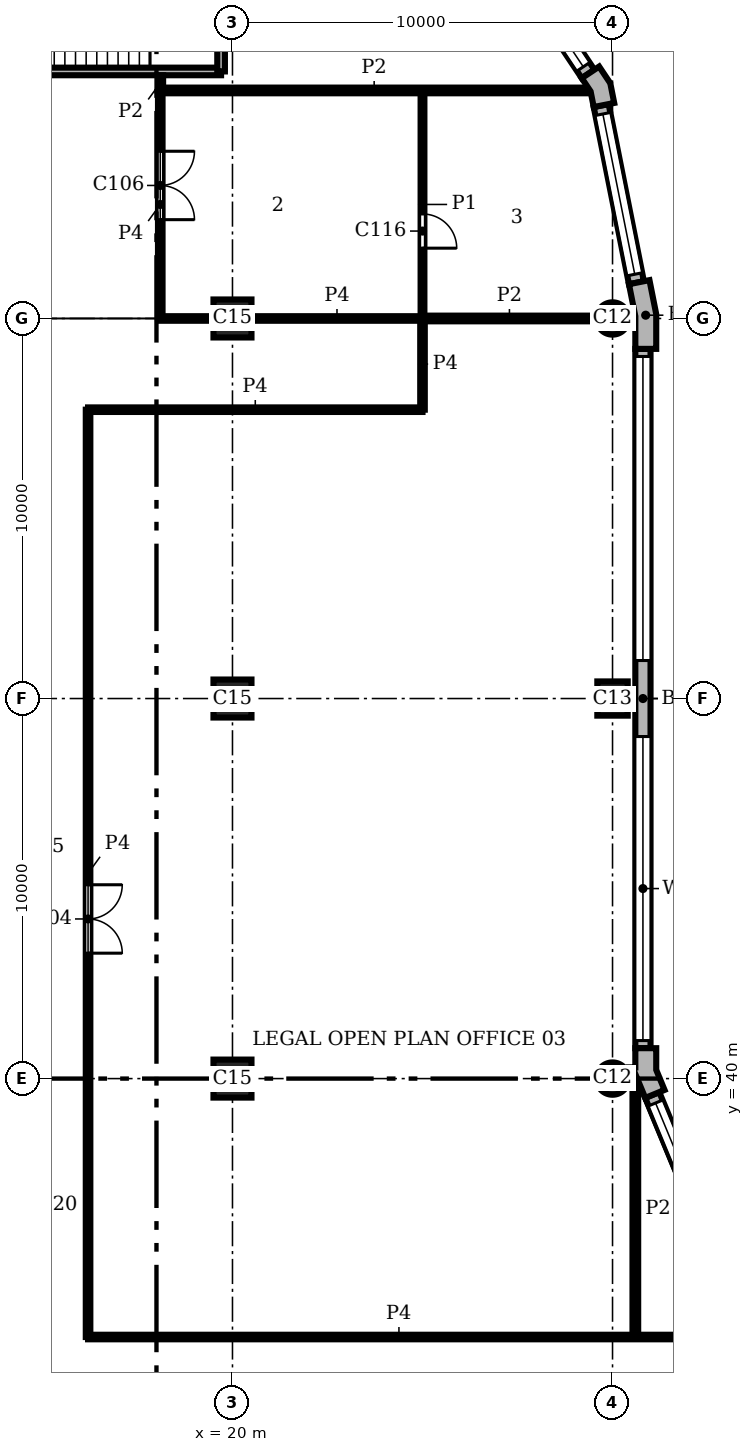
"""IFC4 building model, lengths in metres.
Left out: names, types, materials, properties, quantities, classifications, styles, units other than length and angle.
Written with IfcOpenShell. Run it as: python <this file> out.ifc"""

import sys

from ifc_helpers import new_model, si_unit, direction, frame, frame_2d, origin, origin_2d, place, context, subcontext, project, spatial, polyline, rectangle, circle, outline, extrude, element, fill, save


model = new_model("IFC4")
c1 = context("Model", 3, precision=1e-05, world=origin(), true_north=direction((0.0, 1.0)))
c2 = subcontext(c1, "Body", "Model", "MODEL_VIEW")
j1 = project(units=[si_unit("LENGTHUNIT", "METRE"), si_unit("PLANEANGLEUNIT", "RADIAN")], contexts=[c1])
p1 = place(None, origin())
s1 = spatial("IfcSite", under=j1, at=p1, CompositionType="ELEMENT")
p2 = place(p1, origin())
s2 = spatial("IfcBuilding", under=s1, at=p2, CompositionType="ELEMENT")
p3 = place(p2, frame((0.0, 0.0, 251.4)))
s3 = spatial("IfcBuildingStorey", under=s2, at=p3, CompositionType="ELEMENT", Elevation=251.4)
p4 = place(p3, frame((30.0, 40.0, 0.0), z_axis=(0.0, 0.0, 1.0), x_axis=(1.0, 0.0, 0.0)))
e1 = element("IfcColumn", 1, at=p4, inside=s3, PredefinedType="COLUMN", context=c2, shape_type="SweptSolid", body=[
    extrude(circle(Radius=0.425, at=origin_2d()), origin(), (0.0, 0.0, 1.0), 3.9),
])
p5 = place(p3, frame((30.0, 50.0, 0.0), z_axis=(0.0, 0.0, 1.0), x_axis=(0.0, 1.0, 0.0)))
e2 = element("IfcColumn", 2, at=p5, inside=s3, PredefinedType="COLUMN", context=c2, shape_type="SweptSolid", body=[
    extrude(rectangle(XDim=0.9, YDim=0.8, at=origin_2d()), origin(), (0.0, 0.0, 1.0), 3.9),
])
p6 = place(p3, frame((30.0, 60.0, 0.0), z_axis=(0.0, 0.0, 1.0), x_axis=(1.0, 0.0, 0.0)))
e3 = element("IfcColumn", 3, at=p6, inside=s3, PredefinedType="COLUMN", context=c2, shape_type="SweptSolid", body=[
    extrude(circle(Radius=0.425, at=origin_2d()), origin(), (0.0, 0.0, 1.0), 3.9),
])
for number, where, z_axis, x_axis in (
    (4, (20.0, 40.0, 0.0), (0.0, 0.0, 1.0), (1.0, 0.0, 0.0)),
    (5, (20.0, 50.0, 0.0), (0.0, 0.0, 1.0), (1.0, 0.0, 0.0)),
    (6, (20.0, 60.0, 0.0), (0.0, 0.0, 1.0), (1.0, 0.0, 0.0)),
):
    element("IfcColumn", number, at=place(p3, frame(where, z_axis=z_axis, x_axis=x_axis)), inside=s3, PredefinedType="COLUMN", context=c2, shape_type="SweptSolid", body=[
        extrude(rectangle(XDim=1.0, YDim=1.0, at=origin_2d()), origin(), (0.0, 0.0, 1.0), 3.9),
    ])
p7 = place(p3, origin())
e7 = element("IfcWall", 7, at=p7, inside=s3, PredefinedType="SOLIDWALL", context=c2, shape_type="SweptSolid", body=[
    extrude(outline(polyline([(30.62, 39.995), (30.62, 40.071), (30.861, 39.49), (31.23, 39.644), (31.369, 39.701), (31.15, 40.229), (31.15, 40.8), (31.0, 40.8), (30.6, 40.8), (30.6, 40.295), (30.425, 40.295), (30.425, 39.995), (30.62, 39.995)])), origin(), (0.0, 0.0, 1.0), 3.9),
])
e8 = element("IfcWall", 8, at=p7, inside=s3, PredefinedType="SOLIDWALL", context=c2, shape_type="SweptSolid", body=[
    extrude(outline(polyline([(31.0, 59.2), (31.15, 59.2), (31.15, 60.113), (30.972, 61.009), (30.825, 60.98), (30.432, 60.902), (30.6, 60.059), (30.6, 59.2), (31.0, 59.2)])), origin(), (0.0, 0.0, 1.0), 3.9),
])
e9 = element("IfcWall", 9, at=p7, inside=s3, PredefinedType="SOLIDWALL", context=c2, shape_type="SweptSolid", body=[
    extrude(outline(polyline([(29.897, 65.641), (30.045, 65.67), (29.941, 66.189), (29.648, 66.629), (29.523, 66.545), (29.19, 66.323), (29.423, 65.974), (29.505, 65.563), (29.897, 65.641)])), origin(), (0.0, 0.0, 1.0), 3.9),
])
p8 = place(p3, frame((33.362, 33.974, 0.0), z_axis=(0.0, 0.0, 1.0), x_axis=(-0.382655745237, 0.923891000409, 0.0)))
e10 = element("IfcWall", 10, at=p8, inside=s3, PredefinedType="SOLIDWALL", context=c2, shape_type="SweptSolid", body=[
    extrude(rectangle(XDim=6.053, YDim=0.4, at=frame_2d((3.027, 0.0))), origin(), (0.0, 0.0, 1.0), 3.9),
])
p9 = place(p8, frame((0.227, 0.0, 0.9)))
e11 = element("IfcOpeningElement", 11, at=p9, cuts=e10, PredefinedType="OPENING", context=c2, shape_type="SweptSolid", body=[
    extrude(rectangle(XDim=5.6, YDim=2.35, at=frame_2d((2.8, 1.175))), frame((0.0, 0.21, 0.0), z_axis=(0.0, -1.0, 0.0), x_axis=(1.0, 0.0, 0.0)), (0.0, 0.0, 1.0), 0.42),
])
p10 = place(p3, frame((30.8, 40.8, 0.0), z_axis=(0.0, 0.0, 1.0), x_axis=(0.0, 1.0, 0.0)))
e12 = element("IfcWall", 12, at=p10, inside=s3, PredefinedType="SOLIDWALL", context=c2, shape_type="SweptSolid", body=[
    extrude(rectangle(XDim=18.4, YDim=0.4, at=frame_2d((9.2, 0.0))), origin(), (0.0, 0.0, 1.0), 3.9),
])
p11 = place(p10, frame((0.2, 0.0, 0.9)))
e13 = element("IfcOpeningElement", 13, at=p11, cuts=e12, PredefinedType="OPENING", context=c2, shape_type="SweptSolid", body=[
    extrude(rectangle(XDim=8.0, YDim=2.35, at=frame_2d((4.0, 1.175))), frame((0.0, 0.21, 0.0), z_axis=(0.0, -1.0, 0.0), x_axis=(1.0, 0.0, 0.0)), (0.0, 0.0, 1.0), 0.42),
])
p12 = place(p10, frame((10.2, 0.0, 0.9)))
e14 = element("IfcOpeningElement", 14, at=p12, cuts=e12, PredefinedType="OPENING", context=c2, shape_type="SweptSolid", body=[
    extrude(rectangle(XDim=8.0, YDim=2.35, at=frame_2d((4.0, 1.175))), frame((0.0, 0.21, 0.0), z_axis=(0.0, -1.0, 0.0), x_axis=(1.0, 0.0, 0.0)), (0.0, 0.0, 1.0), 0.42),
])
p13 = place(p3, frame((30.629, 60.941, 0.0), z_axis=(0.0, 0.0, 1.0), x_axis=(-0.195098533057, 0.98078364709, 0.0)))
e15 = element("IfcWall", 15, at=p13, inside=s3, PredefinedType="SOLIDWALL", context=c2, shape_type="SweptSolid", body=[
    extrude(rectangle(XDim=4.753, YDim=0.4, at=frame_2d((2.376, 0.0))), origin(), (0.0, 0.0, 1.0), 3.9),
])
p14 = place(p13, frame((0.226, 0.0, 0.9)))
e16 = element("IfcOpeningElement", 16, at=p14, cuts=e15, PredefinedType="OPENING", context=c2, shape_type="SweptSolid", body=[
    extrude(rectangle(XDim=4.3, YDim=2.35, at=frame_2d((2.15, 1.175))), frame((0.0, 0.21, 0.0), z_axis=(0.0, -1.0, 0.0), x_axis=(1.0, 0.0, 0.0)), (0.0, 0.0, 1.0), 0.42),
])
p15 = place(p3, frame((29.357, 66.434, 0.0), z_axis=(0.0, 0.0, 1.0), x_axis=(-0.555541552266, 0.831488775454, 0.0)))
e17 = element("IfcWall", 17, at=p15, inside=s3, PredefinedType="SOLIDWALL", context=c2, shape_type="SweptSolid", body=[
    extrude(rectangle(XDim=4.753, YDim=0.4, at=frame_2d((2.376, 0.0))), origin(), (0.0, 0.0, 1.0), 3.9),
])
p16 = place(p15, frame((0.226, 0.0, 0.9)))
e18 = element("IfcOpeningElement", 18, at=p16, cuts=e17, PredefinedType="OPENING", context=c2, shape_type="SweptSolid", body=[
    extrude(rectangle(XDim=4.3, YDim=2.35, at=frame_2d((2.15, 1.175))), frame((0.0, 0.21, 0.0), z_axis=(0.0, -1.0, 0.0), x_axis=(1.0, 0.0, 0.0)), (0.0, 0.0, 1.0), 0.42),
])
p17 = place(p3, frame((13.1, 66.5, 0.0), z_axis=(0.0, 0.0, 1.0), x_axis=(1.0, 0.0, 0.0)))
e19 = element("IfcWall", 19, at=p17, inside=s3, PredefinedType="SHEAR", context=c2, shape_type="SweptSolid", body=[
    extrude(rectangle(XDim=6.6, YDim=0.2, at=frame_2d((3.3, 0.0))), origin(), (0.0, 0.0, 1.0), 3.58),
])
p18 = place(p17, frame((0.375, 0.0, 0.0)))
e20 = element("IfcOpeningElement", 20, at=p18, cuts=e19, PredefinedType="OPENING", context=c2, shape_type="SweptSolid", body=[
    extrude(rectangle(XDim=1.0, YDim=2.1, at=frame_2d((0.5, 1.05))), frame((0.0, 0.11, 0.0), z_axis=(0.0, -1.0, 0.0), x_axis=(1.0, 0.0, 0.0)), (0.0, 0.0, 1.0), 0.22),
])
p19 = place(p3, frame((19.7, 66.5, 0.0), z_axis=(0.0, 0.0, 1.0), x_axis=(0.0, 1.0, 0.0)))
e21 = element("IfcWall", 21, at=p19, inside=s3, PredefinedType="SHEAR", context=c2, shape_type="SweptSolid", body=[
    extrude(rectangle(XDim=3.3, YDim=0.2, at=frame_2d((1.65, 0.0))), origin(), (0.0, 0.0, 1.0), 3.58),
])
p20 = place(p3, frame((25.0, 60.0, 0.0), z_axis=(0.0, 0.0, 1.0), x_axis=(0.0, 1.0, 0.0)))
e22 = element("IfcWall", 22, at=p20, inside=s3, PredefinedType="PARTITIONING", context=c2, shape_type="SweptSolid", body=[
    extrude(rectangle(XDim=6.0, YDim=0.1, at=frame_2d((3.0, 0.0))), origin(), (0.0, 0.0, 1.0), 3.58),
])
p21 = place(p20, frame((1.85, 0.0, 0.0)))
e23 = element("IfcOpeningElement", 23, at=p21, cuts=e22, PredefinedType="OPENING", context=c2, shape_type="SweptSolid", body=[
    extrude(rectangle(XDim=0.9, YDim=2.1, at=frame_2d((0.45, 1.05))), frame((0.0, 0.06, 0.0), z_axis=(0.0, -1.0, 0.0), x_axis=(1.0, 0.0, 0.0)), (0.0, 0.0, 1.0), 0.12),
])
p22 = place(p3, frame((18.1, 66.0, 0.0), z_axis=(0.0, 0.0, 1.0), x_axis=(0.0, 1.0, 0.0)))
e24 = element("IfcWall", 24, at=p22, inside=s3, PredefinedType="PARTITIONING", context=c2, shape_type="SweptSolid", body=[
    extrude(rectangle(XDim=0.4, YDim=0.15, at=frame_2d((0.2, 0.0))), origin(), (0.0, 0.0, 1.0), 3.58),
])
p23 = place(p3, frame((30.6, 33.2, 0.0), z_axis=(0.0, 0.0, 1.0), x_axis=(0.0, 1.0, 0.0)))
e25 = element("IfcWall", 25, at=p23, inside=s3, PredefinedType="PARTITIONING", context=c2, shape_type="SweptSolid", body=[
    extrude(rectangle(XDim=6.738, YDim=0.15, at=frame_2d((3.369, 0.0))), origin(), (0.0, 0.0, 1.0), 3.58),
])
p24 = place(p3, frame((25.0, 60.0, 0.0), z_axis=(0.0, 0.0, 1.0), x_axis=(1.0, 0.0, 0.0)))
e26 = element("IfcWall", 26, at=p24, inside=s3, PredefinedType="PARTITIONING", context=c2, shape_type="SweptSolid", body=[
    extrude(rectangle(XDim=4.575, YDim=0.15, at=frame_2d((2.288, 0.0))), origin(), (0.0, 0.0, 1.0), 3.58),
])
p25 = place(p3, frame((18.1, 66.0, 0.0), z_axis=(0.0, 0.0, 1.0), x_axis=(1.0, 0.0, 0.0)))
e27 = element("IfcWall", 27, at=p25, inside=s3, PredefinedType="PARTITIONING", context=c2, shape_type="SweptSolid", body=[
    extrude(rectangle(XDim=11.256, YDim=0.15, at=frame_2d((5.628, 0.0))), origin(), (0.0, 0.0, 1.0), 3.58),
])
p26 = place(p3, frame((16.2, 33.2, 0.0), z_axis=(0.0, 0.0, 1.0), x_axis=(0.0, 1.0, 0.0)))
e28 = element("IfcWall", 28, at=p26, inside=s3, PredefinedType="PARTITIONING", context=c2, shape_type="SweptSolid", body=[
    extrude(rectangle(XDim=24.4, YDim=0.12, at=frame_2d((12.2, 0.0))), origin(), (0.0, 0.0, 1.0), 3.58),
])
p27 = place(p26, frame((10.1, 0.0, 0.0)))
e29 = element("IfcOpeningElement", 29, at=p27, cuts=e28, PredefinedType="OPENING", context=c2, shape_type="SweptSolid", body=[
    extrude(rectangle(XDim=1.8, YDim=2.1, at=frame_2d((0.9, 1.05))), frame((0.0, 0.07, 0.0), z_axis=(0.0, -1.0, 0.0), x_axis=(1.0, 0.0, 0.0)), (0.0, 0.0, 1.0), 0.14),
])
p28 = place(p3, frame((18.1, 60.0, 0.0), z_axis=(0.0, 0.0, 1.0), x_axis=(0.0, 1.0, 0.0)))
e30 = element("IfcWall", 30, at=p28, inside=s3, PredefinedType="PARTITIONING", context=c2, shape_type="SweptSolid", body=[
    extrude(rectangle(XDim=6.0, YDim=0.12, at=frame_2d((3.0, 0.0))), origin(), (0.0, 0.0, 1.0), 3.58),
])
p29 = place(p28, frame((2.6, 0.0, 0.0)))
e31 = element("IfcOpeningElement", 31, at=p29, cuts=e30, PredefinedType="OPENING", context=c2, shape_type="SweptSolid", body=[
    extrude(rectangle(XDim=1.8, YDim=2.1, at=frame_2d((0.9, 1.05))), frame((0.0, 0.07, 0.0), z_axis=(0.0, -1.0, 0.0), x_axis=(1.0, 0.0, 0.0)), (0.0, 0.0, 1.0), 0.14),
])
p30 = place(p3, frame((25.0, 57.6, 0.0), z_axis=(0.0, 0.0, 1.0), x_axis=(0.0, 1.0, 0.0)))
e32 = element("IfcWall", 32, at=p30, inside=s3, PredefinedType="PARTITIONING", context=c2, shape_type="SweptSolid", body=[
    extrude(rectangle(XDim=2.4, YDim=0.12, at=frame_2d((1.2, 0.0))), origin(), (0.0, 0.0, 1.0), 3.58),
])
p31 = place(p3, frame((16.2, 33.2, 0.0), z_axis=(0.0, 0.0, 1.0), x_axis=(1.0, 0.0, 0.0)))
e33 = element("IfcWall", 33, at=p31, inside=s3, PredefinedType="PARTITIONING", context=c2, shape_type="SweptSolid", body=[
    extrude(rectangle(XDim=16.36, YDim=0.12, at=frame_2d((8.18, 0.0))), origin(), (0.0, 0.0, 1.0), 3.58),
])
p32 = place(p3, frame((16.2, 57.6, 0.0), z_axis=(0.0, 0.0, 1.0), x_axis=(1.0, 0.0, 0.0)))
e34 = element("IfcWall", 34, at=p32, inside=s3, PredefinedType="PARTITIONING", context=c2, shape_type="SweptSolid", body=[
    extrude(rectangle(XDim=8.8, YDim=0.12, at=frame_2d((4.4, 0.0))), origin(), (0.0, 0.0, 1.0), 3.58),
])
p33 = place(p3, frame((18.1, 60.0, 0.0), z_axis=(0.0, 0.0, 1.0), x_axis=(1.0, 0.0, 0.0)))
e35 = element("IfcWall", 35, at=p33, inside=s3, PredefinedType="PARTITIONING", context=c2, shape_type="SweptSolid", body=[
    extrude(rectangle(XDim=1.4, YDim=0.12, at=frame_2d((0.7, 0.0))), origin(), (0.0, 0.0, 1.0), 3.58),
])
p34 = place(p3, frame((20.5, 60.0, 0.0), z_axis=(0.0, 0.0, 1.0), x_axis=(1.0, 0.0, 0.0)))
e36 = element("IfcWall", 36, at=p34, inside=s3, PredefinedType="PARTITIONING", context=c2, shape_type="SweptSolid", body=[
    extrude(rectangle(XDim=4.5, YDim=0.12, at=frame_2d((2.25, 0.0))), origin(), (0.0, 0.0, 1.0), 3.58),
])
p35 = place(p9, origin())
e37 = element("IfcWindow", 37, at=p35, inside=s3, PartitioningType="SINGLE_PANEL", PredefinedType="WINDOW", context=c2, shape_type="SweptSolid", body=[
    extrude(rectangle(XDim=5.6, YDim=2.35, at=frame_2d((2.8, 1.175))), frame((0.0, 0.16, 0.0), z_axis=(0.0, -1.0, 0.0), x_axis=(1.0, 0.0, 0.0)), (0.0, 0.0, 1.0), 0.06),
])
fill(e11, e37)
p36 = place(p11, origin())
e38 = element("IfcWindow", 38, at=p36, inside=s3, PartitioningType="SINGLE_PANEL", PredefinedType="WINDOW", context=c2, shape_type="SweptSolid", body=[
    extrude(rectangle(XDim=8.0, YDim=2.35, at=frame_2d((4.0, 1.175))), frame((0.0, 0.16, 0.0), z_axis=(0.0, -1.0, 0.0), x_axis=(1.0, 0.0, 0.0)), (0.0, 0.0, 1.0), 0.06),
])
fill(e13, e38)
p37 = place(p12, origin())
e39 = element("IfcWindow", 39, at=p37, inside=s3, PartitioningType="SINGLE_PANEL", PredefinedType="WINDOW", context=c2, shape_type="SweptSolid", body=[
    extrude(rectangle(XDim=8.0, YDim=2.35, at=frame_2d((4.0, 1.175))), frame((0.0, 0.16, 0.0), z_axis=(0.0, -1.0, 0.0), x_axis=(1.0, 0.0, 0.0)), (0.0, 0.0, 1.0), 0.06),
])
fill(e14, e39)
p38 = place(p14, origin())
e40 = element("IfcWindow", 40, at=p38, inside=s3, PartitioningType="SINGLE_PANEL", PredefinedType="WINDOW", context=c2, shape_type="SweptSolid", body=[
    extrude(rectangle(XDim=4.3, YDim=2.35, at=frame_2d((2.15, 1.175))), frame((0.0, 0.16, 0.0), z_axis=(0.0, -1.0, 0.0), x_axis=(1.0, 0.0, 0.0)), (0.0, 0.0, 1.0), 0.06),
])
fill(e16, e40)
p39 = place(p16, origin())
e41 = element("IfcWindow", 41, at=p39, inside=s3, PartitioningType="SINGLE_PANEL", PredefinedType="WINDOW", context=c2, shape_type="SweptSolid", body=[
    extrude(rectangle(XDim=4.3, YDim=2.35, at=frame_2d((2.15, 1.175))), frame((0.0, 0.16, 0.0), z_axis=(0.0, -1.0, 0.0), x_axis=(1.0, 0.0, 0.0)), (0.0, 0.0, 1.0), 0.06),
])
fill(e18, e41)
p40 = place(p27, frame((1.8, 0.0, 0.0), z_axis=(0.0, 0.0, 1.0), x_axis=(-1.0, 0.0, 0.0)))
e42 = element("IfcDoor", 42, at=p40, inside=s3, OperationType="DOUBLE_DOOR_SINGLE_SWING", PredefinedType="DOOR", context=c2, shape_type="SweptSolid", body=[
    extrude(rectangle(XDim=1.8, YDim=2.1, at=frame_2d((0.9, 1.05))), frame((0.0, 0.025, 0.0), z_axis=(0.0, -1.0, 0.0), x_axis=(1.0, 0.0, 0.0)), (0.0, 0.0, 1.0), 0.05),
])
fill(e29, e42)
p41 = place(p29, frame((1.8, 0.0, 0.0), z_axis=(0.0, 0.0, 1.0), x_axis=(-1.0, 0.0, 0.0)))
e43 = element("IfcDoor", 43, at=p41, inside=s3, OperationType="DOUBLE_DOOR_SINGLE_SWING", PredefinedType="DOOR", context=c2, shape_type="SweptSolid", body=[
    extrude(rectangle(XDim=1.8, YDim=2.1, at=frame_2d((0.9, 1.05))), frame((0.0, 0.025, 0.0), z_axis=(0.0, -1.0, 0.0), x_axis=(1.0, 0.0, 0.0)), (0.0, 0.0, 1.0), 0.05),
])
fill(e31, e43)
p42 = place(p21, frame((0.9, 0.0, 0.0), z_axis=(0.0, 0.0, 1.0), x_axis=(-1.0, 0.0, 0.0)))
e44 = element("IfcDoor", 44, at=p42, inside=s3, OperationType="SINGLE_SWING_RIGHT", PredefinedType="DOOR", context=c2, shape_type="SweptSolid", body=[
    extrude(rectangle(XDim=0.9, YDim=2.1, at=frame_2d((0.45, 1.05))), frame((0.0, 0.025, 0.0), z_axis=(0.0, -1.0, 0.0), x_axis=(1.0, 0.0, 0.0)), (0.0, 0.0, 1.0), 0.05),
])
fill(e23, e44)
save(model, sys.argv[1])
